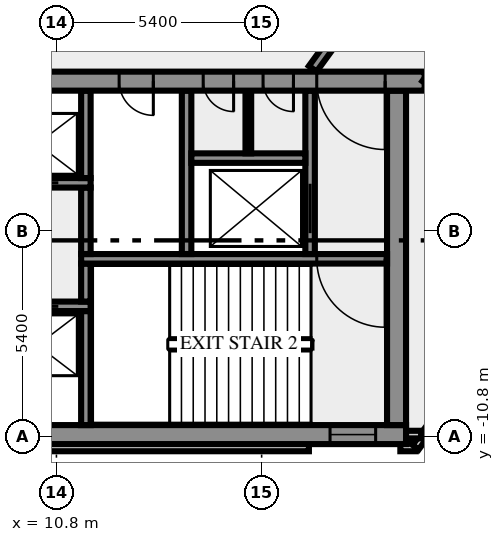
"""IFC4 building model, lengths in metres.
Left out: names, types, materials, properties, quantities, classifications, styles, units other than length and angle.
Written with IfcOpenShell. Run it as: python <this file> out.ifc"""

import sys

from ifc_helpers import new_model, si_unit, direction, frame, frame_2d, origin, place, context, subcontext, project, spatial, rectangle, extrude, element, fill, save


model = new_model("IFC4")
c1 = context("Model", 3, precision=1e-05, world=origin(), true_north=direction((0.0, 1.0)))
c2 = subcontext(c1, "Body", "Model", "MODEL_VIEW")
j1 = project(units=[si_unit("LENGTHUNIT", "METRE"), si_unit("PLANEANGLEUNIT", "RADIAN")], contexts=[c1])
p1 = place(None, origin())
s1 = spatial("IfcSite", under=j1, at=p1, CompositionType="ELEMENT")
p2 = place(p1, origin())
s2 = spatial("IfcBuilding", under=s1, at=p2, CompositionType="ELEMENT")
p3 = place(p2, frame((0.0, 0.0, 156.0)))
s3 = spatial("IfcBuildingStorey", under=s2, at=p3, CompositionType="ELEMENT", Elevation=156.0)
p4 = place(p3, frame((-17.444, -11.088, 0.0), z_axis=(0.0, 0.0, 1.0), x_axis=(1.0, 0.0, 0.0)))
e1 = element("IfcWall", 1, at=p4, inside=s3, PredefinedType="SOLIDWALL", context=c2, shape_type="SweptSolid", body=[
    extrude(rectangle(XDim=34.888, YDim=0.2, at=frame_2d((17.444, 0.0))), origin(), (0.0, 0.0, 1.0), 3.65),
])
p5 = place(p3, frame((19.85, -11.088, 0.0), z_axis=(0.0, 0.0, 1.0), x_axis=(1.0, 0.0, 0.0)))
e2 = element("IfcWall", 2, at=p5, inside=s3, PredefinedType="SOLIDWALL", context=c2, shape_type="SweptSolid", body=[
    extrude(rectangle(XDim=0.406, YDim=0.2, at=frame_2d((0.203, 0.0))), origin(), (0.0, 0.0, 1.0), 3.65),
])
p6 = place(p3, frame((20.253, -11.083, 0.0), z_axis=(0.0, 0.0, 1.0), x_axis=(0.587766567315, 0.809030569476, 0.0)))
e3 = element("IfcWall", 3, at=p6, inside=s3, PredefinedType="SOLIDWALL", context=c2, shape_type="SweptSolid", body=[
    extrude(rectangle(XDim=2.688, YDim=0.2, at=frame_2d((1.344, 0.0))), origin(), (0.0, 0.0, 1.0), 3.65),
])
p7 = place(p3, frame((19.98, -10.75, 0.0), z_axis=(0.0, 0.0, 1.0), x_axis=(1.0, 0.0, 0.0)))
e4 = element("IfcWall", 4, at=p7, inside=s3, PredefinedType="SOLIDWALL", context=c2, shape_type="SweptSolid", body=[
    extrude(rectangle(XDim=0.417, YDim=0.2, at=frame_2d((0.208, 0.0))), origin(), (0.0, 0.0, 1.0), 3.65),
])
p8 = place(p3, frame((-20.0, -10.75, 0.0), z_axis=(0.0, 0.0, 1.0), x_axis=(1.0, 0.0, 0.0)))
e5 = element("IfcWall", 5, at=p8, inside=s3, PredefinedType="SHEAR", context=c2, shape_type="SweptSolid", body=[
    extrude(rectangle(XDim=40.0, YDim=0.5, at=frame_2d((20.0, 0.0))), origin(), (0.0, 0.0, 1.0), 3.65),
])
p9 = place(p8, frame((0.8, 0.0, 1.0)))
e6 = element("IfcOpeningElement", 6, at=p9, cuts=e5, PredefinedType="OPENING", context=c2, shape_type="SweptSolid", body=[
    extrude(rectangle(XDim=1.2, YDim=1.2, at=frame_2d((0.6, 0.6))), frame((0.0, 0.26, 0.0), z_axis=(0.0, -1.0, 0.0), x_axis=(1.0, 0.0, 0.0)), (0.0, 0.0, 1.0), 0.52),
])
p10 = place(p8, frame((38.0, 0.0, 1.0)))
e7 = element("IfcOpeningElement", 7, at=p10, cuts=e5, PredefinedType="OPENING", context=c2, shape_type="SweptSolid", body=[
    extrude(rectangle(XDim=1.2, YDim=1.2, at=frame_2d((0.6, 0.6))), frame((0.0, 0.26, 0.0), z_axis=(0.0, -1.0, 0.0), x_axis=(1.0, 0.0, 0.0)), (0.0, 0.0, 1.0), 0.52),
])
p11 = place(p3, frame((11.575, -10.5, 0.0), z_axis=(0.0, 0.0, 1.0), x_axis=(0.0, 1.0, 0.0)))
e8 = element("IfcWall", 8, at=p11, inside=s3, PredefinedType="SHEAR", context=c2, shape_type="SweptSolid", body=[
    extrude(rectangle(XDim=3.0, YDim=0.25, at=frame_2d((1.5, 0.0))), origin(), (0.0, 0.0, 1.0), 3.65),
])
p12 = place(p3, frame((19.75, -10.5, 0.0), z_axis=(0.0, 0.0, 1.0), x_axis=(0.0, 1.0, 0.0)))
e9 = element("IfcWall", 9, at=p12, inside=s3, PredefinedType="SHEAR", context=c2, shape_type="SweptSolid", body=[
    extrude(rectangle(XDim=8.8, YDim=0.5, at=frame_2d((4.4, 0.0))), origin(), (0.0, 0.0, 1.0), 3.65),
])
p13 = place(p3, frame((11.7, -7.375, 0.0), z_axis=(0.0, 0.0, 1.0), x_axis=(-1.0, 0.0, 0.0)))
e10 = element("IfcWall", 10, at=p13, inside=s3, PredefinedType="SHEAR", context=c2, shape_type="SweptSolid", body=[
    extrude(rectangle(XDim=23.4, YDim=0.25, at=frame_2d((11.7, 0.0))), origin(), (0.0, 0.0, 1.0), 3.65),
])
p14 = place(p13, frame((22.012, 0.0, 0.0)))
e11 = element("IfcOpeningElement", 11, at=p14, cuts=e10, PredefinedType="OPENING", context=c2, shape_type="SweptSolid", body=[
    extrude(rectangle(XDim=0.9, YDim=2.1, at=frame_2d((0.45, 1.05))), frame((0.0, 0.135, 0.0), z_axis=(0.0, -1.0, 0.0), x_axis=(1.0, 0.0, 0.0)), (0.0, 0.0, 1.0), 0.27),
])
p15 = place(p13, frame((20.05, 0.0, 0.0)))
e12 = element("IfcOpeningElement", 12, at=p15, cuts=e10, PredefinedType="OPENING", context=c2, shape_type="SweptSolid", body=[
    extrude(rectangle(XDim=0.9, YDim=2.1, at=frame_2d((0.45, 1.05))), frame((0.0, 0.135, 0.0), z_axis=(0.0, -1.0, 0.0), x_axis=(1.0, 0.0, 0.0)), (0.0, 0.0, 1.0), 0.27),
])
p16 = place(p13, frame((17.088, 0.0, 0.0)))
e13 = element("IfcOpeningElement", 13, at=p16, cuts=e10, PredefinedType="OPENING", context=c2, shape_type="SweptSolid", body=[
    extrude(rectangle(XDim=0.9, YDim=2.1, at=frame_2d((0.45, 1.05))), frame((0.0, 0.135, 0.0), z_axis=(0.0, -1.0, 0.0), x_axis=(1.0, 0.0, 0.0)), (0.0, 0.0, 1.0), 0.27),
])
p17 = place(p13, frame((14.45, 0.0, 0.0)))
e14 = element("IfcOpeningElement", 14, at=p17, cuts=e10, PredefinedType="OPENING", context=c2, shape_type="SweptSolid", body=[
    extrude(rectangle(XDim=0.9, YDim=2.1, at=frame_2d((0.45, 1.05))), frame((0.0, 0.135, 0.0), z_axis=(0.0, -1.0, 0.0), x_axis=(1.0, 0.0, 0.0)), (0.0, 0.0, 1.0), 0.27),
])
p18 = place(p13, frame((12.95, 0.0, 0.0)))
e15 = element("IfcOpeningElement", 15, at=p18, cuts=e10, PredefinedType="OPENING", context=c2, shape_type="SweptSolid", body=[
    extrude(rectangle(XDim=0.9, YDim=2.1, at=frame_2d((0.45, 1.05))), frame((0.0, 0.135, 0.0), z_axis=(0.0, -1.0, 0.0), x_axis=(1.0, 0.0, 0.0)), (0.0, 0.0, 1.0), 0.27),
])
p19 = place(p13, frame((11.475, 0.0, 0.0)))
e16 = element("IfcOpeningElement", 16, at=p19, cuts=e10, PredefinedType="OPENING", context=c2, shape_type="SweptSolid", body=[
    extrude(rectangle(XDim=0.9, YDim=2.1, at=frame_2d((0.45, 1.05))), frame((0.0, 0.135, 0.0), z_axis=(0.0, -1.0, 0.0), x_axis=(1.0, 0.0, 0.0)), (0.0, 0.0, 1.0), 0.27),
])
p20 = place(p13, frame((10.45, 0.0, 0.0)))
e17 = element("IfcOpeningElement", 17, at=p20, cuts=e10, PredefinedType="OPENING", context=c2, shape_type="SweptSolid", body=[
    extrude(rectangle(XDim=0.5, YDim=2.1, at=frame_2d((0.25, 1.05))), frame((0.0, 0.135, 0.0), z_axis=(0.0, -1.0, 0.0), x_axis=(1.0, 0.0, 0.0)), (0.0, 0.0, 1.0), 0.27),
])
p21 = place(p13, frame((8.35, 0.0, 0.0)))
e18 = element("IfcOpeningElement", 18, at=p21, cuts=e10, PredefinedType="OPENING", context=c2, shape_type="SweptSolid", body=[
    extrude(rectangle(XDim=1.1, YDim=2.1, at=frame_2d((0.55, 1.05))), frame((0.0, 0.135, 0.0), z_axis=(0.0, -1.0, 0.0), x_axis=(1.0, 0.0, 0.0)), (0.0, 0.0, 1.0), 0.27),
])
p22 = place(p13, frame((5.85, 0.0, 0.0)))
e19 = element("IfcOpeningElement", 19, at=p22, cuts=e10, PredefinedType="OPENING", context=c2, shape_type="SweptSolid", body=[
    extrude(rectangle(XDim=1.1, YDim=2.1, at=frame_2d((0.55, 1.05))), frame((0.0, 0.135, 0.0), z_axis=(0.0, -1.0, 0.0), x_axis=(1.0, 0.0, 0.0)), (0.0, 0.0, 1.0), 0.27),
])
p23 = place(p13, frame((3.35, 0.0, 0.0)))
e20 = element("IfcOpeningElement", 20, at=p23, cuts=e10, PredefinedType="OPENING", context=c2, shape_type="SweptSolid", body=[
    extrude(rectangle(XDim=1.1, YDim=2.1, at=frame_2d((0.55, 1.05))), frame((0.0, 0.135, 0.0), z_axis=(0.0, -1.0, 0.0), x_axis=(1.0, 0.0, 0.0)), (0.0, 0.0, 1.0), 0.27),
])
p24 = place(p13, frame((0.85, 0.0, 0.0)))
e21 = element("IfcOpeningElement", 21, at=p24, cuts=e10, PredefinedType="OPENING", context=c2, shape_type="SweptSolid", body=[
    extrude(rectangle(XDim=1.1, YDim=2.1, at=frame_2d((0.55, 1.05))), frame((0.0, 0.135, 0.0), z_axis=(0.0, -1.0, 0.0), x_axis=(1.0, 0.0, 0.0)), (0.0, 0.0, 1.0), 0.27),
])
p25 = place(p3, frame((11.575, -7.25, 0.0), z_axis=(0.0, 0.0, 1.0), x_axis=(0.0, 1.0, 0.0)))
e22 = element("IfcWall", 22, at=p25, inside=s3, PredefinedType="SHEAR", context=c2, shape_type="SweptSolid", body=[
    extrude(rectangle(XDim=1.0, YDim=0.25, at=frame_2d((0.5, 0.0))), origin(), (0.0, 0.0, 1.0), 3.65),
])
p26 = place(p3, frame((19.5, -6.125, 0.0), z_axis=(0.0, 0.0, 1.0), x_axis=(-1.0, 0.0, 0.0)))
e23 = element("IfcWall", 23, at=p26, inside=s3, PredefinedType="SHEAR", context=c2, shape_type="SweptSolid", body=[
    extrude(rectangle(XDim=8.05, YDim=0.25, at=frame_2d((4.025, 0.0))), origin(), (0.0, 0.0, 1.0), 3.65),
])
p27 = place(p26, frame((0.05, 0.0, 0.0)))
e24 = element("IfcOpeningElement", 24, at=p27, cuts=e23, PredefinedType="OPENING", context=c2, shape_type="SweptSolid", body=[
    extrude(rectangle(XDim=1.8, YDim=2.1, at=frame_2d((0.9, 1.05))), frame((0.0, 0.135, 0.0), z_axis=(0.0, -1.0, 0.0), x_axis=(1.0, 0.0, 0.0)), (0.0, 0.0, 1.0), 0.27),
])
p28 = place(p3, frame((11.575, -6.0, 0.0), z_axis=(0.0, 0.0, 1.0), x_axis=(0.0, 1.0, 0.0)))
e25 = element("IfcWall", 25, at=p28, inside=s3, PredefinedType="SHEAR", context=c2, shape_type="SweptSolid", body=[
    extrude(rectangle(XDim=1.75, YDim=0.25, at=frame_2d((0.875, 0.0))), origin(), (0.0, 0.0, 1.0), 3.65),
])
p29 = place(p3, frame((14.225, -6.0, 0.0), z_axis=(0.0, 0.0, 1.0), x_axis=(0.0, 1.0, 0.0)))
e26 = element("IfcWall", 26, at=p29, inside=s3, PredefinedType="SHEAR", context=c2, shape_type="SweptSolid", body=[
    extrude(rectangle(XDim=4.3, YDim=0.25, at=frame_2d((2.15, 0.0))), origin(), (0.0, 0.0, 1.0), 3.65),
])
p30 = place(p3, frame((17.475, -6.0, 0.0), z_axis=(0.0, 0.0, 1.0), x_axis=(0.0, 1.0, 0.0)))
e27 = element("IfcWall", 27, at=p30, inside=s3, PredefinedType="SHEAR", context=c2, shape_type="SweptSolid", body=[
    extrude(rectangle(XDim=4.3, YDim=0.25, at=frame_2d((2.15, 0.0))), origin(), (0.0, 0.0, 1.0), 3.65),
])
p31 = place(p30, frame((0.55, 0.0, 0.0)))
e28 = element("IfcOpeningElement", 28, at=p31, cuts=e27, PredefinedType="OPENING", context=c2, shape_type="SweptSolid", body=[
    extrude(rectangle(XDim=1.3, YDim=2.1, at=frame_2d((0.65, 1.05))), frame((0.0, 0.135, 0.0), z_axis=(0.0, -1.0, 0.0), x_axis=(1.0, 0.0, 0.0)), (0.0, 0.0, 1.0), 0.27),
])
p32 = place(p3, frame((-0.6, -4.125, 0.0), z_axis=(0.0, 0.0, 1.0), x_axis=(1.0, 0.0, 0.0)))
e29 = element("IfcWall", 29, at=p32, inside=s3, PredefinedType="SHEAR", context=c2, shape_type="SweptSolid", body=[
    extrude(rectangle(XDim=12.3, YDim=0.25, at=frame_2d((6.15, 0.0))), origin(), (0.0, 0.0, 1.0), 3.65),
])
p33 = place(p32, frame((2.75, 0.0, 0.0)))
e30 = element("IfcOpeningElement", 30, at=p33, cuts=e29, PredefinedType="OPENING", context=c2, shape_type="SweptSolid", body=[
    extrude(rectangle(XDim=1.3, YDim=2.1, at=frame_2d((0.65, 1.05))), frame((0.0, 0.135, 0.0), z_axis=(0.0, -1.0, 0.0), x_axis=(1.0, 0.0, 0.0)), (0.0, 0.0, 1.0), 0.27),
])
p34 = place(p32, frame((5.35, 0.0, 0.0)))
e31 = element("IfcOpeningElement", 31, at=p34, cuts=e29, PredefinedType="OPENING", context=c2, shape_type="SweptSolid", body=[
    extrude(rectangle(XDim=1.1, YDim=2.1, at=frame_2d((0.55, 1.05))), frame((0.0, 0.135, 0.0), z_axis=(0.0, -1.0, 0.0), x_axis=(1.0, 0.0, 0.0)), (0.0, 0.0, 1.0), 0.27),
])
p35 = place(p32, frame((7.85, 0.0, 0.0)))
e32 = element("IfcOpeningElement", 32, at=p35, cuts=e29, PredefinedType="OPENING", context=c2, shape_type="SweptSolid", body=[
    extrude(rectangle(XDim=1.1, YDim=2.1, at=frame_2d((0.55, 1.05))), frame((0.0, 0.135, 0.0), z_axis=(0.0, -1.0, 0.0), x_axis=(1.0, 0.0, 0.0)), (0.0, 0.0, 1.0), 0.27),
])
p36 = place(p32, frame((10.35, 0.0, 0.0)))
e33 = element("IfcOpeningElement", 33, at=p36, cuts=e29, PredefinedType="OPENING", context=c2, shape_type="SweptSolid", body=[
    extrude(rectangle(XDim=1.1, YDim=2.1, at=frame_2d((0.55, 1.05))), frame((0.0, 0.135, 0.0), z_axis=(0.0, -1.0, 0.0), x_axis=(1.0, 0.0, 0.0)), (0.0, 0.0, 1.0), 0.27),
])
p37 = place(p3, frame((11.575, -4.0, 0.0), z_axis=(0.0, 0.0, 1.0), x_axis=(0.0, 1.0, 0.0)))
e34 = element("IfcWall", 34, at=p37, inside=s3, PredefinedType="SHEAR", context=c2, shape_type="SweptSolid", body=[
    extrude(rectangle(XDim=2.3, YDim=0.25, at=frame_2d((1.15, 0.0))), origin(), (0.0, 0.0, 1.0), 3.65),
])
p38 = place(p3, frame((14.35, -3.475, 0.0), z_axis=(0.0, 0.0, 1.0), x_axis=(1.0, 0.0, 0.0)))
e35 = element("IfcWall", 35, at=p38, inside=s3, PredefinedType="SHEAR", context=c2, shape_type="SweptSolid", body=[
    extrude(rectangle(XDim=3.0, YDim=0.25, at=frame_2d((1.5, 0.0))), origin(), (0.0, 0.0, 1.0), 3.65),
])
p39 = place(p3, frame((15.85, -3.35, 0.0), z_axis=(0.0, 0.0, 1.0), x_axis=(0.0, 1.0, 0.0)))
e36 = element("IfcWall", 36, at=p39, inside=s3, PredefinedType="PARTITIONING", context=c2, shape_type="SweptSolid", body=[
    extrude(rectangle(XDim=1.65, YDim=0.15, at=frame_2d((0.825, 0.0))), origin(), (0.0, 0.0, 1.0), 3.65),
])
p40 = place(p3, frame((20.49, -1.45, 0.0), z_axis=(0.0, 0.0, 1.0), x_axis=(-1.0, 0.0, 0.0)))
e37 = element("IfcWall", 37, at=p40, inside=s3, PredefinedType="SHEAR", context=c2, shape_type="SweptSolid", body=[
    extrude(rectangle(XDim=40.98, YDim=0.5, at=frame_2d((20.49, 0.0))), origin(), (0.0, 0.0, 1.0), 3.65),
])
p41 = place(p40, frame((38.14, 0.0, 0.0)))
e38 = element("IfcOpeningElement", 38, at=p41, cuts=e37, PredefinedType="OPENING", context=c2, shape_type="SweptSolid", body=[
    extrude(rectangle(XDim=1.8, YDim=2.1, at=frame_2d((0.9, 1.05))), frame((0.0, 0.26, 0.0), z_axis=(0.0, -1.0, 0.0), x_axis=(1.0, 0.0, 0.0)), (0.0, 0.0, 1.0), 0.52),
])
p42 = place(p40, frame((35.89, 0.0, 0.0)))
e39 = element("IfcOpeningElement", 39, at=p42, cuts=e37, PredefinedType="OPENING", context=c2, shape_type="SweptSolid", body=[
    extrude(rectangle(XDim=0.9, YDim=2.1, at=frame_2d((0.45, 1.05))), frame((0.0, 0.26, 0.0), z_axis=(0.0, -1.0, 0.0), x_axis=(1.0, 0.0, 0.0)), (0.0, 0.0, 1.0), 0.52),
])
p43 = place(p40, frame((32.94, 0.0, 0.0)))
e40 = element("IfcOpeningElement", 40, at=p43, cuts=e37, PredefinedType="OPENING", context=c2, shape_type="SweptSolid", body=[
    extrude(rectangle(XDim=0.9, YDim=2.1, at=frame_2d((0.45, 1.05))), frame((0.0, 0.26, 0.0), z_axis=(0.0, -1.0, 0.0), x_axis=(1.0, 0.0, 0.0)), (0.0, 0.0, 1.0), 0.52),
])
p44 = place(p40, frame((28.802, 0.0, 0.0)))
e41 = element("IfcOpeningElement", 41, at=p44, cuts=e37, PredefinedType="OPENING", context=c2, shape_type="SweptSolid", body=[
    extrude(rectangle(XDim=0.9, YDim=2.1, at=frame_2d((0.45, 1.05))), frame((0.0, 0.26, 0.0), z_axis=(0.0, -1.0, 0.0), x_axis=(1.0, 0.0, 0.0)), (0.0, 0.0, 1.0), 0.52),
])
p45 = place(p40, frame((25.077, 0.0, 0.0)))
e42 = element("IfcOpeningElement", 42, at=p45, cuts=e37, PredefinedType="OPENING", context=c2, shape_type="SweptSolid", body=[
    extrude(rectangle(XDim=0.9, YDim=2.1, at=frame_2d((0.45, 1.05))), frame((0.0, 0.26, 0.0), z_axis=(0.0, -1.0, 0.0), x_axis=(1.0, 0.0, 0.0)), (0.0, 0.0, 1.0), 0.52),
])
p46 = place(p40, frame((21.765, 0.0, 0.0)))
e43 = element("IfcOpeningElement", 43, at=p46, cuts=e37, PredefinedType="OPENING", context=c2, shape_type="SweptSolid", body=[
    extrude(rectangle(XDim=2.0, YDim=2.1, at=frame_2d((1.0, 1.05))), frame((0.0, 0.26, 0.0), z_axis=(0.0, -1.0, 0.0), x_axis=(1.0, 0.0, 0.0)), (0.0, 0.0, 1.0), 0.52),
])
p47 = place(p40, frame((7.14, 0.0, 0.0)))
e44 = element("IfcOpeningElement", 44, at=p47, cuts=e37, PredefinedType="OPENING", context=c2, shape_type="SweptSolid", body=[
    extrude(rectangle(XDim=0.9, YDim=2.1, at=frame_2d((0.45, 1.05))), frame((0.0, 0.26, 0.0), z_axis=(0.0, -1.0, 0.0), x_axis=(1.0, 0.0, 0.0)), (0.0, 0.0, 1.0), 0.52),
])
p48 = place(p40, frame((5.028, 0.0, 0.0)))
e45 = element("IfcOpeningElement", 45, at=p48, cuts=e37, PredefinedType="OPENING", context=c2, shape_type="SweptSolid", body=[
    extrude(rectangle(XDim=0.8, YDim=2.1, at=frame_2d((0.4, 1.05))), frame((0.0, 0.26, 0.0), z_axis=(0.0, -1.0, 0.0), x_axis=(1.0, 0.0, 0.0)), (0.0, 0.0, 1.0), 0.52),
])
p49 = place(p40, frame((3.452, 0.0, 0.0)))
e46 = element("IfcOpeningElement", 46, at=p49, cuts=e37, PredefinedType="OPENING", context=c2, shape_type="SweptSolid", body=[
    extrude(rectangle(XDim=0.8, YDim=2.1, at=frame_2d((0.4, 1.05))), frame((0.0, 0.26, 0.0), z_axis=(0.0, -1.0, 0.0), x_axis=(1.0, 0.0, 0.0)), (0.0, 0.0, 1.0), 0.52),
])
p50 = place(p40, frame((1.04, 0.0, 0.0)))
e47 = element("IfcOpeningElement", 47, at=p50, cuts=e37, PredefinedType="OPENING", context=c2, shape_type="SweptSolid", body=[
    extrude(rectangle(XDim=1.8, YDim=2.1, at=frame_2d((0.9, 1.05))), frame((0.0, 0.26, 0.0), z_axis=(0.0, -1.0, 0.0), x_axis=(1.0, 0.0, 0.0)), (0.0, 0.0, 1.0), 0.52),
])
p51 = place(p3, frame((17.545, -1.125, 0.0), z_axis=(0.0, 0.0, 1.0), x_axis=(0.587786330937, 0.809016210693, 0.0)))
e48 = element("IfcWall", 48, at=p51, inside=s3, PredefinedType="SOLIDWALL", context=c2, shape_type="SweptSolid", body=[
    extrude(rectangle(XDim=30.103, YDim=0.25, at=frame_2d((15.052, 0.0))), origin(), (0.0, 0.0, 1.0), 3.65),
])
p52 = place(p51, frame((3.441, 0.0, 0.0)))
e49 = element("IfcOpeningElement", 49, at=p52, cuts=e48, PredefinedType="OPENING", context=c2, shape_type="SweptSolid", body=[
    extrude(rectangle(XDim=0.9, YDim=2.1, at=frame_2d((0.45, 1.05))), frame((0.0, 0.135, 0.0), z_axis=(0.0, -1.0, 0.0), x_axis=(1.0, 0.0, 0.0)), (0.0, 0.0, 1.0), 0.27),
])
p53 = place(p51, frame((28.729, 0.0, 0.0)))
e50 = element("IfcOpeningElement", 50, at=p53, cuts=e48, PredefinedType="OPENING", context=c2, shape_type="SweptSolid", body=[
    extrude(rectangle(XDim=0.9, YDim=2.1, at=frame_2d((0.45, 1.05))), frame((0.0, 0.135, 0.0), z_axis=(0.0, -1.0, 0.0), x_axis=(1.0, 0.0, 0.0)), (0.0, 0.0, 1.0), 0.27),
])
p54 = place(p3, frame((37.236, 21.469, 0.0), z_axis=(0.0, 0.0, 1.0), x_axis=(-0.58778344073, -0.809018310549, 0.0)))
e51 = element("IfcWall", 51, at=p54, inside=s3, PredefinedType="SOLIDWALL", context=c2, shape_type="SweptSolid", body=[
    extrude(rectangle(XDim=28.42, YDim=0.25, at=frame_2d((14.21, 0.0))), origin(), (0.0, 0.0, 1.0), 3.65),
])
p55 = place(p54, frame((14.554, 0.0, 0.0)))
e52 = element("IfcOpeningElement", 52, at=p55, cuts=e51, PredefinedType="OPENING", context=c2, shape_type="SweptSolid", body=[
    extrude(rectangle(XDim=0.9, YDim=2.1, at=frame_2d((0.45, 1.05))), frame((0.0, 0.135, 0.0), z_axis=(0.0, -1.0, 0.0), x_axis=(1.0, 0.0, 0.0)), (0.0, 0.0, 1.0), 0.27),
])
p56 = place(p54, frame((10.255, 0.0, 0.0)))
e53 = element("IfcOpeningElement", 53, at=p56, cuts=e51, PredefinedType="OPENING", context=c2, shape_type="SweptSolid", body=[
    extrude(rectangle(XDim=0.9, YDim=2.1, at=frame_2d((0.45, 1.05))), frame((0.0, 0.135, 0.0), z_axis=(0.0, -1.0, 0.0), x_axis=(1.0, 0.0, 0.0)), (0.0, 0.0, 1.0), 0.27),
])
p57 = place(p54, frame((11.854, 0.0, 0.0)))
e54 = element("IfcOpeningElement", 54, at=p57, cuts=e51, PredefinedType="OPENING", context=c2, shape_type="SweptSolid", body=[
    extrude(rectangle(XDim=0.9, YDim=2.1, at=frame_2d((0.45, 1.05))), frame((0.0, 0.135, 0.0), z_axis=(0.0, -1.0, 0.0), x_axis=(1.0, 0.0, 0.0)), (0.0, 0.0, 1.0), 0.27),
])
p58 = place(p10, origin())
e55 = element("IfcWindow", 55, at=p58, inside=s3, PartitioningType="SINGLE_PANEL", PredefinedType="WINDOW", context=c2, shape_type="SweptSolid", body=[
    extrude(rectangle(XDim=1.2, YDim=1.2, at=frame_2d((0.6, 0.6))), frame((0.0, 0.03, 0.0), z_axis=(0.0, -1.0, 0.0), x_axis=(1.0, 0.0, 0.0)), (0.0, 0.0, 1.0), 0.06),
])
fill(e7, e55)
p59 = place(p24, origin())
e56 = element("IfcDoor", 56, at=p59, inside=s3, OperationType="DOUBLE_DOOR_SLIDING", PredefinedType="DOOR", context=c2, shape_type="SweptSolid", body=[
    extrude(rectangle(XDim=1.1, YDim=2.1, at=frame_2d((0.55, 1.05))), frame((0.0, 0.025, 0.0), z_axis=(0.0, -1.0, 0.0), x_axis=(1.0, 0.0, 0.0)), (0.0, 0.0, 1.0), 0.05),
])
fill(e21, e56)
p60 = place(p27, origin())
e57 = element("IfcDoor", 57, at=p60, inside=s3, OperationType="DOUBLE_DOOR_SINGLE_SWING", PredefinedType="DOOR", context=c2, shape_type="SweptSolid", body=[
    extrude(rectangle(XDim=1.8, YDim=2.1, at=frame_2d((0.9, 1.05))), frame((0.0, 0.025, 0.0), z_axis=(0.0, -1.0, 0.0), x_axis=(1.0, 0.0, 0.0)), (0.0, 0.0, 1.0), 0.05),
])
fill(e24, e57)
p61 = place(p31, origin())
e58 = element("IfcDoor", 58, at=p61, inside=s3, OperationType="DOUBLE_DOOR_SLIDING", PredefinedType="DOOR", context=c2, shape_type="SweptSolid", body=[
    extrude(rectangle(XDim=1.3, YDim=2.1, at=frame_2d((0.65, 1.05))), frame((0.0, 0.025, 0.0), z_axis=(0.0, -1.0, 0.0), x_axis=(1.0, 0.0, 0.0)), (0.0, 0.0, 1.0), 0.05),
])
fill(e28, e58)
p62 = place(p36, origin())
e59 = element("IfcDoor", 59, at=p62, inside=s3, OperationType="DOUBLE_DOOR_SLIDING", PredefinedType="DOOR", context=c2, shape_type="SweptSolid", body=[
    extrude(rectangle(XDim=1.1, YDim=2.1, at=frame_2d((0.55, 1.05))), frame((0.0, 0.025, 0.0), z_axis=(0.0, -1.0, 0.0), x_axis=(1.0, 0.0, 0.0)), (0.0, 0.0, 1.0), 0.05),
])
fill(e33, e59)
p63 = place(p47, origin())
e60 = element("IfcDoor", 60, at=p63, inside=s3, OperationType="SINGLE_SWING_LEFT", PredefinedType="DOOR", context=c2, shape_type="SweptSolid", body=[
    extrude(rectangle(XDim=0.9, YDim=2.1, at=frame_2d((0.45, 1.05))), frame((0.0, 0.025, 0.0), z_axis=(0.0, -1.0, 0.0), x_axis=(1.0, 0.0, 0.0)), (0.0, 0.0, 1.0), 0.05),
])
fill(e44, e60)
p64 = place(p48, origin())
e61 = element("IfcDoor", 61, at=p64, inside=s3, OperationType="SINGLE_SWING_LEFT", PredefinedType="DOOR", context=c2, shape_type="SweptSolid", body=[
    extrude(rectangle(XDim=0.8, YDim=2.1, at=frame_2d((0.4, 1.05))), frame((0.0, 0.025, 0.0), z_axis=(0.0, -1.0, 0.0), x_axis=(1.0, 0.0, 0.0)), (0.0, 0.0, 1.0), 0.05),
])
fill(e45, e61)
p65 = place(p49, origin())
e62 = element("IfcDoor", 62, at=p65, inside=s3, OperationType="SINGLE_SWING_LEFT", PredefinedType="DOOR", context=c2, shape_type="SweptSolid", body=[
    extrude(rectangle(XDim=0.8, YDim=2.1, at=frame_2d((0.4, 1.05))), frame((0.0, 0.025, 0.0), z_axis=(0.0, -1.0, 0.0), x_axis=(1.0, 0.0, 0.0)), (0.0, 0.0, 1.0), 0.05),
])
fill(e46, e62)
p66 = place(p50, origin())
e63 = element("IfcDoor", 63, at=p66, inside=s3, OperationType="DOUBLE_DOOR_SINGLE_SWING", PredefinedType="DOOR", context=c2, shape_type="SweptSolid", body=[
    extrude(rectangle(XDim=1.8, YDim=2.1, at=frame_2d((0.9, 1.05))), frame((0.0, 0.025, 0.0), z_axis=(0.0, -1.0, 0.0), x_axis=(1.0, 0.0, 0.0)), (0.0, 0.0, 1.0), 0.05),
])
fill(e47, e63)
save(model, sys.argv[1])
